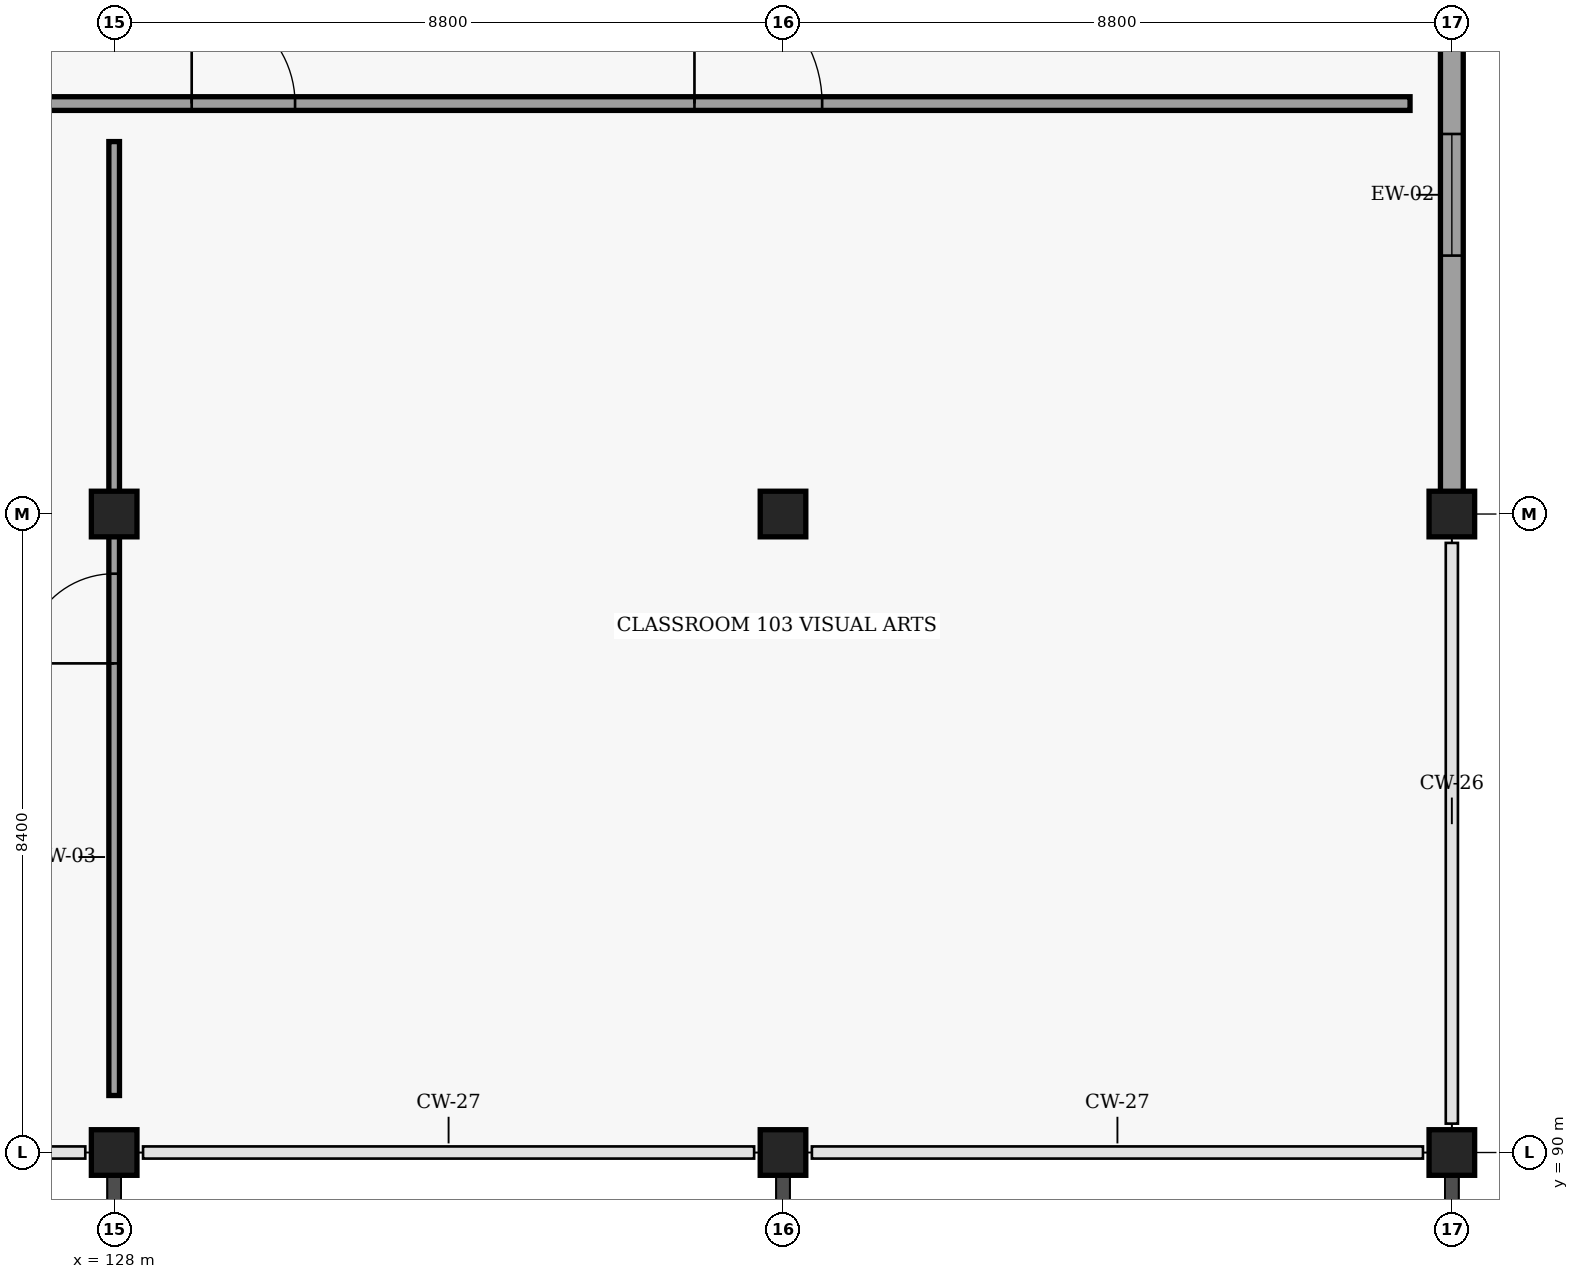
"""IFC4 building model, lengths in metres.
Left out: names, types, materials, properties, quantities, classifications, styles, units other than length and angle.
Written with IfcOpenShell. Run it as: python <this file> out.ifc"""

import sys

from ifc_helpers import new_model, si_unit, direction, frame, frame_2d, origin, origin_2d, place, context, subcontext, project, spatial, rectangle, extrude, element, fill, save


model = new_model("IFC4")
c1 = context("Model", 3, precision=1e-05, world=origin(), true_north=direction((0.0, 1.0)))
c2 = subcontext(c1, "Body", "Model", "MODEL_VIEW")
j1 = project(units=[si_unit("LENGTHUNIT", "METRE"), si_unit("PLANEANGLEUNIT", "RADIAN")], contexts=[c1])
p1 = place(None, origin())
s1 = spatial("IfcSite", under=j1, at=p1, CompositionType="ELEMENT")
p2 = place(p1, origin())
s2 = spatial("IfcBuilding", under=s1, at=p2, CompositionType="ELEMENT")
p3 = place(p2, frame((0.0, 0.0, 4.8)))
s3 = spatial("IfcBuildingStorey", under=s2, at=p3, CompositionType="ELEMENT", Elevation=4.8)
for number, where, z_axis, x_axis in (
    (1, (128.0, 90.0, 0.0), (0.0, 0.0, 1.0), (1.0, 0.0, 0.0)),
    (2, (128.0, 98.4, 0.0), (0.0, 0.0, 1.0), (1.0, 0.0, 0.0)),
    (3, (136.8, 90.0, 0.0), (0.0, 0.0, 1.0), (1.0, 0.0, 0.0)),
    (4, (136.8, 98.4, 0.0), (0.0, 0.0, 1.0), (1.0, 0.0, 0.0)),
    (5, (145.6, 90.0, 0.0), (0.0, 0.0, 1.0), (1.0, 0.0, 0.0)),
    (6, (145.6, 98.4, 0.0), (0.0, 0.0, 1.0), (1.0, 0.0, 0.0)),
):
    element("IfcColumn", number, at=place(p3, frame(where, z_axis=z_axis, x_axis=x_axis)), inside=s3, PredefinedType="COLUMN", context=c2, shape_type="SweptSolid", body=[
        extrude(rectangle(XDim=0.6, YDim=0.6, at=origin_2d()), origin(), (0.0, 0.0, 1.0), 4.2),
    ])
p4 = place(p3, frame((145.6, 98.5, 0.0), z_axis=(0.0, 0.0, 1.0), x_axis=(0.0, 1.0, 0.0)))
e7 = element("IfcWall", 7, at=p4, inside=s3, PredefinedType="SOLIDWALL", context=c2, shape_type="SweptSolid", body=[
    extrude(rectangle(XDim=8.2, YDim=0.3, at=frame_2d((4.1, 0.0))), origin(), (0.0, 0.0, 1.0), 3.495),
])
p5 = place(p4, frame((3.3, 0.0, 0.9)))
e8 = element("IfcOpeningElement", 8, at=p5, cuts=e7, PredefinedType="OPENING", context=c2, shape_type="SweptSolid", body=[
    extrude(rectangle(XDim=1.6, YDim=2.1, at=frame_2d((0.8, 1.05))), frame((0.0, 0.16, 0.0), z_axis=(0.0, -1.0, 0.0), x_axis=(1.0, 0.0, 0.0)), (0.0, 0.0, 1.0), 0.32),
])
p6 = place(p3, frame((42.15, 103.8, 0.0), z_axis=(0.0, 0.0, 1.0), x_axis=(1.0, 0.0, 0.0)))
e9 = element("IfcWall", 9, at=p6, inside=s3, PredefinedType="PARTITIONING", context=c2, shape_type="SweptSolid", body=[
    extrude(rectangle(XDim=102.9, YDim=0.18, at=frame_2d((51.45, 0.0))), origin(), (0.0, 0.0, 1.0), 3.094),
])
p7 = place(p6, frame((8.085, 0.0, 0.0)))
e10 = element("IfcOpeningElement", 10, at=p7, cuts=e9, PredefinedType="OPENING", context=c2, shape_type="SweptSolid", body=[
    extrude(rectangle(XDim=0.98, YDim=2.12, at=frame_2d((0.49, 1.06))), frame((0.0, 0.1, 0.0), z_axis=(0.0, -1.0, 0.0), x_axis=(1.0, 0.0, 0.0)), (0.0, 0.0, 1.0), 0.2),
])
p8 = place(p6, frame((17.125, 0.0, 0.0)))
e11 = element("IfcOpeningElement", 11, at=p8, cuts=e9, PredefinedType="OPENING", context=c2, shape_type="SweptSolid", body=[
    extrude(rectangle(XDim=0.95, YDim=2.12, at=frame_2d((0.475, 1.06))), frame((0.0, 0.1, 0.0), z_axis=(0.0, -1.0, 0.0), x_axis=(1.0, 0.0, 0.0)), (0.0, 0.0, 1.0), 0.2),
])
p9 = place(p6, frame((25.265, 0.0, 0.0)))
e12 = element("IfcOpeningElement", 12, at=p9, cuts=e9, PredefinedType="OPENING", context=c2, shape_type="SweptSolid", body=[
    extrude(rectangle(XDim=0.92, YDim=2.1, at=frame_2d((0.46, 1.05))), frame((0.0, 0.1, 0.0), z_axis=(0.0, -1.0, 0.0), x_axis=(1.0, 0.0, 0.0)), (0.0, 0.0, 1.0), 0.2),
])
p10 = place(p6, frame((34.27, 0.0, 0.0)))
e13 = element("IfcOpeningElement", 13, at=p10, cuts=e9, PredefinedType="OPENING", context=c2, shape_type="SweptSolid", body=[
    extrude(rectangle(XDim=0.96, YDim=2.08, at=frame_2d((0.48, 1.04))), frame((0.0, 0.1, 0.0), z_axis=(0.0, -1.0, 0.0), x_axis=(1.0, 0.0, 0.0)), (0.0, 0.0, 1.0), 0.2),
])
p11 = place(p6, frame((42.425, 0.0, 0.0)))
e14 = element("IfcOpeningElement", 14, at=p11, cuts=e9, PredefinedType="OPENING", context=c2, shape_type="SweptSolid", body=[
    extrude(rectangle(XDim=0.9, YDim=2.06, at=frame_2d((0.45, 1.03))), frame((0.0, 0.1, 0.0), z_axis=(0.0, -1.0, 0.0), x_axis=(1.0, 0.0, 0.0)), (0.0, 0.0, 1.0), 0.2),
])
p12 = place(p6, frame((51.76, 0.0, 0.0)))
e15 = element("IfcOpeningElement", 15, at=p12, cuts=e9, PredefinedType="OPENING", context=c2, shape_type="SweptSolid", body=[
    extrude(rectangle(XDim=1.18, YDim=2.18, at=frame_2d((0.59, 1.09))), frame((0.0, 0.1, 0.0), z_axis=(0.0, -1.0, 0.0), x_axis=(1.0, 0.0, 0.0)), (0.0, 0.0, 1.0), 0.2),
])
p13 = place(p6, frame((59.375, 0.0, 0.0)))
e16 = element("IfcOpeningElement", 16, at=p13, cuts=e9, PredefinedType="OPENING", context=c2, shape_type="SweptSolid", body=[
    extrude(rectangle(XDim=1.3, YDim=2.2, at=frame_2d((0.65, 1.1))), frame((0.0, 0.1, 0.0), z_axis=(0.0, -1.0, 0.0), x_axis=(1.0, 0.0, 0.0)), (0.0, 0.0, 1.0), 0.2),
])
p14 = place(p6, frame((69.2, 0.0, 0.0)))
e17 = element("IfcOpeningElement", 17, at=p14, cuts=e9, PredefinedType="OPENING", context=c2, shape_type="SweptSolid", body=[
    extrude(rectangle(XDim=1.5, YDim=2.25, at=frame_2d((0.75, 1.125))), frame((0.0, 0.1, 0.0), z_axis=(0.0, -1.0, 0.0), x_axis=(1.0, 0.0, 0.0)), (0.0, 0.0, 1.0), 0.2),
])
p15 = place(p6, frame((76.555, 0.0, 0.0)))
e18 = element("IfcOpeningElement", 18, at=p15, cuts=e9, PredefinedType="OPENING", context=c2, shape_type="SweptSolid", body=[
    extrude(rectangle(XDim=1.24, YDim=2.2, at=frame_2d((0.62, 1.1))), frame((0.0, 0.1, 0.0), z_axis=(0.0, -1.0, 0.0), x_axis=(1.0, 0.0, 0.0)), (0.0, 0.0, 1.0), 0.2),
])
p16 = place(p6, frame((86.87, 0.0, 0.0)))
e19 = element("IfcOpeningElement", 19, at=p16, cuts=e9, PredefinedType="OPENING", context=c2, shape_type="SweptSolid", body=[
    extrude(rectangle(XDim=1.36, YDim=2.22, at=frame_2d((0.68, 1.11))), frame((0.0, 0.1, 0.0), z_axis=(0.0, -1.0, 0.0), x_axis=(1.0, 0.0, 0.0)), (0.0, 0.0, 1.0), 0.2),
])
p17 = place(p6, frame((93.485, 0.0, 0.0)))
e20 = element("IfcOpeningElement", 20, at=p17, cuts=e9, PredefinedType="OPENING", context=c2, shape_type="SweptSolid", body=[
    extrude(rectangle(XDim=1.68, YDim=2.26, at=frame_2d((0.84, 1.13))), frame((0.0, 0.1, 0.0), z_axis=(0.0, -1.0, 0.0), x_axis=(1.0, 0.0, 0.0)), (0.0, 0.0, 1.0), 0.2),
])
p18 = place(p3, frame((128.0, 90.75, 0.0), z_axis=(0.0, 0.0, 1.0), x_axis=(0.0, 1.0, 0.0)))
e21 = element("IfcWall", 21, at=p18, inside=s3, PredefinedType="PARTITIONING", context=c2, shape_type="SweptSolid", body=[
    extrude(rectangle(XDim=12.55, YDim=0.14, at=frame_2d((6.275, 0.0))), origin(), (0.0, 0.0, 1.0), 3.145),
])
p19 = place(p18, frame((5.685, 0.0, 0.0)))
e22 = element("IfcOpeningElement", 22, at=p19, cuts=e21, PredefinedType="OPENING", context=c2, shape_type="SweptSolid", body=[
    extrude(rectangle(XDim=1.18, YDim=2.18, at=frame_2d((0.59, 1.09))), frame((0.0, 0.08, 0.0), z_axis=(0.0, -1.0, 0.0), x_axis=(1.0, 0.0, 0.0)), (0.0, 0.0, 1.0), 0.16),
])
p20 = place(p5, origin())
e23 = element("IfcWindow", 23, at=p20, inside=s3, PartitioningType="SINGLE_PANEL", PredefinedType="WINDOW", context=c2, shape_type="SweptSolid", body=[
    extrude(rectangle(XDim=1.6, YDim=2.1, at=frame_2d((0.8, 1.05))), frame((0.0, 0.03, 0.0), z_axis=(0.0, -1.0, 0.0), x_axis=(1.0, 0.0, 0.0)), (0.0, 0.0, 1.0), 0.06),
])
fill(e8, e23)
p21 = place(p16, origin())
e24 = element("IfcDoor", 24, at=p21, inside=s3, OperationType="DOUBLE_DOOR_SINGLE_SWING", PredefinedType="DOOR", context=c2, shape_type="SweptSolid", body=[
    extrude(rectangle(XDim=1.36, YDim=2.22, at=frame_2d((0.68, 1.11))), frame((0.0, 0.025, 0.0), z_axis=(0.0, -1.0, 0.0), x_axis=(1.0, 0.0, 0.0)), (0.0, 0.0, 1.0), 0.05),
])
fill(e19, e24)
p22 = place(p17, origin())
e25 = element("IfcDoor", 25, at=p22, inside=s3, OperationType="DOUBLE_DOOR_SINGLE_SWING", PredefinedType="DOOR", context=c2, shape_type="SweptSolid", body=[
    extrude(rectangle(XDim=1.68, YDim=2.26, at=frame_2d((0.84, 1.13))), frame((0.0, 0.025, 0.0), z_axis=(0.0, -1.0, 0.0), x_axis=(1.0, 0.0, 0.0)), (0.0, 0.0, 1.0), 0.05),
])
fill(e20, e25)
p23 = place(p19, origin())
e26 = element("IfcDoor", 26, at=p23, inside=s3, OperationType="SINGLE_SWING_LEFT", PredefinedType="DOOR", context=c2, shape_type="SweptSolid", body=[
    extrude(rectangle(XDim=1.18, YDim=2.18, at=frame_2d((0.59, 1.09))), frame((0.0, 0.025, 0.0), z_axis=(0.0, -1.0, 0.0), x_axis=(1.0, 0.0, 0.0)), (0.0, 0.0, 1.0), 0.05),
])
fill(e22, e26)
save(model, sys.argv[1])
